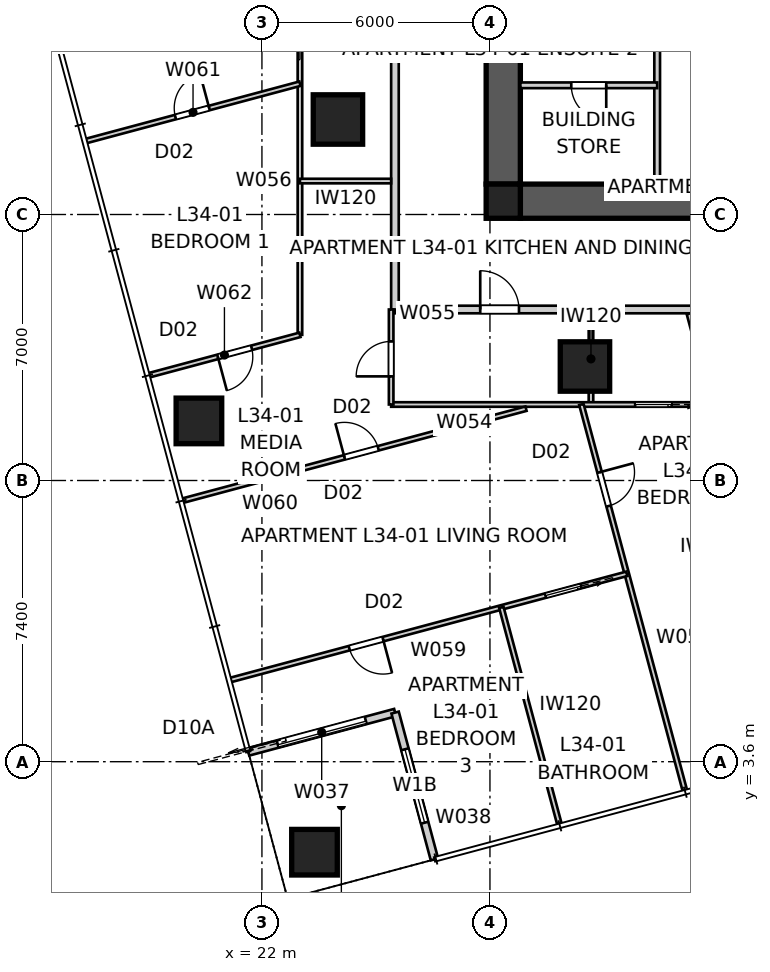
"""IFC4 building model, lengths in metres.
Left out: names, types, materials, properties, quantities, classifications, styles, units other than length and angle.
Written with IfcOpenShell. Run it as: python <this file> out.ifc"""

import sys

from ifc_helpers import new_model, si_unit, direction, frame, frame_2d, origin, origin_2d, place, context, subcontext, project, spatial, polyline, rectangle, outline, extrude, element, fill, save


model = new_model("IFC4")
c1 = context("Model", 3, precision=1e-05, world=origin(), true_north=direction((0.0, 1.0)))
c2 = subcontext(c1, "Body", "Model", "MODEL_VIEW")
j1 = project(units=[si_unit("LENGTHUNIT", "METRE"), si_unit("PLANEANGLEUNIT", "RADIAN")], contexts=[c1])
p1 = place(None, origin())
s1 = spatial("IfcSite", under=j1, at=p1, CompositionType="ELEMENT")
p2 = place(p1, origin())
s2 = spatial("IfcBuilding", under=s1, at=p2, CompositionType="ELEMENT")
p3 = place(p2, frame((0.0, 0.0, 125.2)))
s3 = spatial("IfcBuildingStorey", under=s2, at=p3, CompositionType="ELEMENT", Elevation=125.2)
p4 = place(p3, frame((51.2, 18.35, 0.0), z_axis=(0.0, 0.0, 1.0), x_axis=(-1.0, 0.0, 0.0)))
e1 = element("IfcWall", 1, at=p4, inside=s3, PredefinedType="SHEAR", context=c2, shape_type="SweptSolid", body=[
    extrude(outline(polyline([(0.0, -0.45), (22.4, -0.45), (22.4, -0.025), (22.85, -0.025), (22.85, 0.025), (22.4, 0.025), (22.4, 0.45), (0.0, 0.45), (0.0, 0.025), (-0.45, 0.025), (-0.45, -0.025), (0.0, -0.025), (0.0, -0.45)])), origin(), (0.0, 0.0, 1.0), 3.4),
])
p5 = place(p3, frame((28.35, 41.2, 0.0), z_axis=(0.0, 0.0, 1.0), x_axis=(0.0, -1.0, 0.0)))
e2 = element("IfcWall", 2, at=p5, inside=s3, PredefinedType="SHEAR", context=c2, shape_type="SweptSolid", body=[
    extrude(outline(polyline([(0.0, -0.45), (22.4, -0.45), (22.4, -0.025), (22.85, -0.025), (22.85, 0.025), (22.4, 0.025), (22.4, 0.45), (0.0, 0.45), (0.0, 0.025), (-0.45, 0.025), (-0.45, -0.025), (0.0, -0.025), (0.0, -0.45)])), origin(), (0.0, 0.0, 1.0), 3.4),
])
p6 = place(p5, frame((11.14, 0.0, 0.0)))
e3 = element("IfcOpeningElement", 3, at=p6, cuts=e2, PredefinedType="OPENING", context=c2, shape_type="SweptSolid", body=[
    extrude(rectangle(XDim=1.02, YDim=2.4, at=frame_2d((0.51, 1.2))), frame((0.0, 0.46, 0.0), z_axis=(0.0, -1.0, 0.0), x_axis=(1.0, 0.0, 0.0)), (0.0, 0.0, 1.0), 0.92),
])
p7 = place(p3, frame((28.35, 18.35, 0.0), z_axis=(0.0, 0.0, 1.0), x_axis=(1.0, 0.0, 0.0)))
e4 = element("IfcColumn", 4, at=p7, inside=s3, PredefinedType="COLUMN", context=c2, shape_type="SweptSolid", body=[
    extrude(rectangle(XDim=0.9, YDim=0.9, at=origin_2d()), origin(), (0.0, 0.0, 1.0), 3.4),
])
for number, where, z_axis, x_axis in (
    (5, (23.383, 1.219, 0.0), (0.0, 0.0, 1.0), (1.0, 0.0, 0.0)),
    (6, (20.342, 12.568, 0.0), (0.0, 0.0, 1.0), (1.0, 0.0, 0.0)),
):
    element("IfcColumn", number, at=place(p3, frame(where, z_axis=z_axis, x_axis=x_axis)), inside=s3, PredefinedType="COLUMN", context=c2, shape_type="SweptSolid", body=[
        extrude(rectangle(XDim=1.2, YDim=1.2, at=origin_2d()), origin(), (0.0, 0.0, 1.0), 3.4),
    ])
for number, where, z_axis, x_axis in (
    (7, (24.0, 20.5, 0.0), (0.0, 0.0, 1.0), (1.0, 0.0, 0.0)),
    (8, (30.5, 14.0, 0.0), (0.0, 0.0, 1.0), (1.0, 0.0, 0.0)),
):
    element("IfcColumn", number, at=place(p3, frame(where, z_axis=z_axis, x_axis=x_axis)), inside=s3, PredefinedType="COLUMN", context=c2, shape_type="SweptSolid", body=[
        extrude(rectangle(XDim=1.3, YDim=1.3, at=origin_2d()), origin(), (0.0, 0.0, 1.0), 3.4),
    ])
p8 = place(p3, frame((21.641, 3.857, 0.0), z_axis=(0.0, 0.0, 1.0), x_axis=(0.965919172068, 0.258843877716, 0.0)))
e9 = element("IfcWall", 9, at=p8, inside=s3, PredefinedType="SOLIDWALL", context=c2, shape_type="SweptSolid", body=[
    extrude(rectangle(XDim=4.0, YDim=0.2, at=frame_2d((2.0, 0.0))), origin(), (0.0, 0.0, 1.0), 3.25),
])
p9 = place(p8, frame((0.8, 0.0, 0.0)))
e10 = element("IfcOpeningElement", 10, at=p9, cuts=e9, PredefinedType="OPENING", context=c2, shape_type="SweptSolid", body=[
    extrude(rectangle(XDim=2.4, YDim=2.1, at=frame_2d((1.2, 1.05))), frame((0.0, 0.11, 0.0), z_axis=(0.0, -1.0, 0.0), x_axis=(1.0, 0.0, 0.0)), (0.0, 0.0, 1.0), 0.22),
])
p10 = place(p3, frame((25.504, 4.893, 0.0), z_axis=(0.0, 0.0, 1.0), x_axis=(0.258786931944, -0.965934430412, 0.0)))
e11 = element("IfcWall", 11, at=p10, inside=s3, PredefinedType="SOLIDWALL", context=c2, shape_type="SweptSolid", body=[
    extrude(rectangle(XDim=4.0, YDim=0.2, at=frame_2d((2.0, 0.0))), origin(), (0.0, 0.0, 1.0), 3.25),
])
p11 = place(p10, frame((1.0, 0.0, 0.45)))
e12 = element("IfcOpeningElement", 12, at=p11, cuts=e11, PredefinedType="OPENING", context=c2, shape_type="SweptSolid", body=[
    extrude(rectangle(XDim=2.0, YDim=1.8, at=frame_2d((1.0, 0.9))), frame((0.0, 0.11, 0.0), z_axis=(0.0, -1.0, 0.0), x_axis=(1.0, 0.0, 0.0)), (0.0, 0.0, 1.0), 0.22),
])
p12 = place(p3, frame((25.5, 15.5, 0.0), z_axis=(0.0, 0.0, 1.0), x_axis=(1.0, 0.0, 0.0)))
e13 = element("IfcWall", 13, at=p12, inside=s3, PredefinedType="PARTITIONING", context=c2, shape_type="SweptSolid", body=[
    extrude(rectangle(XDim=28.2, YDim=0.2, at=frame_2d((14.1, 0.0))), origin(), (0.0, 0.0, 1.0), 3.25),
])
p13 = place(p12, frame((2.244, 0.0, 0.0)))
e14 = element("IfcOpeningElement", 14, at=p13, cuts=e13, PredefinedType="OPENING", context=c2, shape_type="SweptSolid", body=[
    extrude(rectangle(XDim=1.02, YDim=2.1, at=frame_2d((0.51, 1.05))), frame((0.0, 0.11, 0.0), z_axis=(0.0, -1.0, 0.0), x_axis=(1.0, 0.0, 0.0)), (0.0, 0.0, 1.0), 0.22),
])
p14 = place(p12, frame((9.542, 0.0, 0.0)))
e15 = element("IfcOpeningElement", 15, at=p14, cuts=e13, PredefinedType="OPENING", context=c2, shape_type="SweptSolid", body=[
    extrude(rectangle(XDim=1.02, YDim=2.34, at=frame_2d((0.51, 1.17))), frame((0.0, 0.11, 0.0), z_axis=(0.0, -1.0, 0.0), x_axis=(1.0, 0.0, 0.0)), (0.0, 0.0, 1.0), 0.22),
])
p15 = place(p12, frame((21.994, 0.0, 0.0)))
e16 = element("IfcOpeningElement", 16, at=p15, cuts=e13, PredefinedType="OPENING", context=c2, shape_type="SweptSolid", body=[
    extrude(rectangle(XDim=1.02, YDim=2.34, at=frame_2d((0.51, 1.17))), frame((0.0, 0.11, 0.0), z_axis=(0.0, -1.0, 0.0), x_axis=(1.0, 0.0, 0.0)), (0.0, 0.0, 1.0), 0.22),
])
p16 = place(p3, frame((25.5, 43.7, 0.0), z_axis=(0.0, 0.0, 1.0), x_axis=(0.0, -1.0, 0.0)))
e17 = element("IfcWall", 17, at=p16, inside=s3, PredefinedType="PARTITIONING", context=c2, shape_type="SweptSolid", body=[
    extrude(rectangle(XDim=28.2, YDim=0.2, at=frame_2d((14.1, 0.0))), origin(), (0.0, 0.0, 1.0), 3.25),
])
p17 = place(p16, frame((8.742, 0.0, 0.0)))
e18 = element("IfcOpeningElement", 18, at=p17, cuts=e17, PredefinedType="OPENING", context=c2, shape_type="SweptSolid", body=[
    extrude(rectangle(XDim=1.02, YDim=2.34, at=frame_2d((0.51, 1.17))), frame((0.0, 0.11, 0.0), z_axis=(0.0, -1.0, 0.0), x_axis=(1.0, 0.0, 0.0)), (0.0, 0.0, 1.0), 0.22),
])
p18 = place(p16, frame((1.808, 0.0, 0.0)))
e19 = element("IfcOpeningElement", 19, at=p18, cuts=e17, PredefinedType="OPENING", context=c2, shape_type="SweptSolid", body=[
    extrude(rectangle(XDim=1.02, YDim=2.1, at=frame_2d((0.51, 1.05))), frame((0.0, 0.11, 0.0), z_axis=(0.0, -1.0, 0.0), x_axis=(1.0, 0.0, 0.0)), (0.0, 0.0, 1.0), 0.22),
])
p19 = place(p3, frame((36.44, 3.682, 0.0), z_axis=(0.0, 0.0, 1.0), x_axis=(-0.258824223352, 0.965924438766, 0.0)))
e20 = element("IfcWall", 20, at=p19, inside=s3, PredefinedType="PARTITIONING", context=c2, shape_type="SweptSolid", body=[
    extrude(rectangle(XDim=12.138, YDim=0.25, at=frame_2d((6.069, 0.0))), origin(), (0.0, 0.0, 1.0), 3.25),
])
p20 = place(p3, frame((32.4, 18.8, 0.0), z_axis=(0.0, 0.0, 1.0), x_axis=(0.0, 1.0, 0.0)))
e21 = element("IfcWall", 21, at=p20, inside=s3, PredefinedType="SOLIDWALL", context=c2, shape_type="SweptSolid", body=[
    extrude(rectangle(XDim=5.9, YDim=0.15, at=frame_2d((2.95, 0.0))), origin(), (0.0, 0.0, 1.0), 3.25),
])
p21 = place(p3, frame((32.4, 21.4, 0.0), z_axis=(0.0, 0.0, 1.0), x_axis=(-1.0, 0.0, 0.0)))
e22 = element("IfcWall", 22, at=p21, inside=s3, PredefinedType="SOLIDWALL", context=c2, shape_type="SweptSolid", body=[
    extrude(rectangle(XDim=3.6, YDim=0.15, at=frame_2d((1.8, 0.0))), origin(), (0.0, 0.0, 1.0), 3.25),
])
p22 = place(p21, frame((1.34, 0.0, 0.0)))
e23 = element("IfcOpeningElement", 23, at=p22, cuts=e22, PredefinedType="OPENING", context=c2, shape_type="SweptSolid", body=[
    extrude(rectangle(XDim=0.92, YDim=2.1, at=frame_2d((0.46, 1.05))), frame((0.0, 0.085, 0.0), z_axis=(0.0, -1.0, 0.0), x_axis=(1.0, 0.0, 0.0)), (0.0, 0.0, 1.0), 0.17),
])
p23 = place(p3, frame((30.658, 15.4, 0.0), z_axis=(0.0, 0.0, 1.0), x_axis=(0.0, -1.0, 0.0)))
e24 = element("IfcWall", 24, at=p23, inside=s3, PredefinedType="PARTITIONING", context=c2, shape_type="SweptSolid", body=[
    extrude(rectangle(XDim=2.4, YDim=0.12, at=frame_2d((1.2, 0.0))), origin(), (0.0, 0.0, 1.0), 3.25),
])
p24 = place(p3, frame((41.07, 13.0, 0.0), z_axis=(0.0, 0.0, 1.0), x_axis=(-1.0, 0.0, 0.0)))
e25 = element("IfcWall", 25, at=p24, inside=s3, PredefinedType="PARTITIONING", context=c2, shape_type="SweptSolid", body=[
    extrude(rectangle(XDim=15.67, YDim=0.12, at=frame_2d((7.835, 0.0))), origin(), (0.0, 0.0, 1.0), 2.55),
])
p25 = place(p24, frame((5.772, 0.0, 0.0)))
e26 = element("IfcOpeningElement", 26, at=p25, cuts=e25, PredefinedType="OPENING", context=c2, shape_type="SweptSolid", body=[
    extrude(rectangle(XDim=0.92, YDim=2.34, at=frame_2d((0.46, 1.17))), frame((0.0, 0.07, 0.0), z_axis=(0.0, -1.0, 0.0), x_axis=(1.0, 0.0, 0.0)), (0.0, 0.0, 1.0), 0.14),
])
p26 = place(p24, frame((8.289, 0.0, 0.0)))
e27 = element("IfcOpeningElement", 27, at=p26, cuts=e25, PredefinedType="OPENING", context=c2, shape_type="SweptSolid", body=[
    extrude(rectangle(XDim=0.96, YDim=2.1, at=frame_2d((0.48, 1.05))), frame((0.0, 0.07, 0.0), z_axis=(0.0, -1.0, 0.0), x_axis=(1.0, 0.0, 0.0)), (0.0, 0.0, 1.0), 0.14),
])
p27 = place(p3, frame((25.4, 13.0, 0.0), z_axis=(0.0, 0.0, 1.0), x_axis=(0.0, 1.0, 0.0)))
e28 = element("IfcWall", 28, at=p27, inside=s3, PredefinedType="PARTITIONING", context=c2, shape_type="SweptSolid", body=[
    extrude(rectangle(XDim=2.5, YDim=0.12, at=frame_2d((1.25, 0.0))), origin(), (0.0, 0.0, 1.0), 3.25),
])
p28 = place(p27, frame((0.74, 0.0, 0.0)))
e29 = element("IfcOpeningElement", 29, at=p28, cuts=e28, PredefinedType="OPENING", context=c2, shape_type="SweptSolid", body=[
    extrude(rectangle(XDim=0.92, YDim=2.34, at=frame_2d((0.46, 1.17))), frame((0.0, 0.07, 0.0), z_axis=(0.0, -1.0, 0.0), x_axis=(1.0, 0.0, 0.0)), (0.0, 0.0, 1.0), 0.14),
])
p29 = place(p3, frame((23.0, 14.833, 0.0), z_axis=(0.0, 0.0, 1.0), x_axis=(0.0, 1.0, 0.0)))
e30 = element("IfcWall", 30, at=p29, inside=s3, PredefinedType="PARTITIONING", context=c2, shape_type="SweptSolid", body=[
    extrude(rectangle(XDim=14.034, YDim=0.12, at=frame_2d((7.017, 0.0))), origin(), (0.0, 0.0, 1.0), 2.55),
])
p30 = place(p29, frame((11.843, 0.0, 0.0)))
e31 = element("IfcOpeningElement", 31, at=p30, cuts=e30, PredefinedType="OPENING", context=c2, shape_type="SweptSolid", body=[
    extrude(rectangle(XDim=0.96, YDim=2.1, at=frame_2d((0.48, 1.05))), frame((0.0, 0.07, 0.0), z_axis=(0.0, -1.0, 0.0), x_axis=(1.0, 0.0, 0.0)), (0.0, 0.0, 1.0), 0.14),
])
p31 = place(p29, frame((8.104, 0.0, 0.0)))
e32 = element("IfcOpeningElement", 32, at=p31, cuts=e30, PredefinedType="OPENING", context=c2, shape_type="SweptSolid", body=[
    extrude(rectangle(XDim=0.96, YDim=2.1, at=frame_2d((0.48, 1.05))), frame((0.0, 0.07, 0.0), z_axis=(0.0, -1.0, 0.0), x_axis=(1.0, 0.0, 0.0)), (0.0, 0.0, 1.0), 0.14),
])
p32 = place(p3, frame((25.4, 18.88, 0.0), z_axis=(0.0, 0.0, 1.0), x_axis=(-1.0, 0.0, 0.0)))
e33 = element("IfcWall", 33, at=p32, inside=s3, PredefinedType="PARTITIONING", context=c2, shape_type="SweptSolid", body=[
    extrude(rectangle(XDim=2.4, YDim=0.12, at=frame_2d((1.2, 0.0))), origin(), (0.0, 0.0, 1.0), 2.722),
])
p33 = place(p3, frame((30.406, 13.0, 0.0), z_axis=(0.0, 0.0, 1.0), x_axis=(0.258819200315, -0.9659257847, 0.0)))
e34 = element("IfcWall", 34, at=p33, inside=s3, PredefinedType="PARTITIONING", context=c2, shape_type="SweptSolid", body=[
    extrude(rectangle(XDim=10.522, YDim=0.12, at=frame_2d((5.261, 0.0))), origin(), (0.0, 0.0, 1.0), 2.722),
])
p34 = place(p33, frame((1.846, 0.0, 0.0)))
e35 = element("IfcOpeningElement", 35, at=p34, cuts=e34, PredefinedType="OPENING", context=c2, shape_type="SweptSolid", body=[
    extrude(rectangle(XDim=0.92, YDim=2.34, at=frame_2d((0.46, 1.17))), frame((0.0, 0.07, 0.0), z_axis=(0.0, -1.0, 0.0), x_axis=(1.0, 0.0, 0.0)), (0.0, 0.0, 1.0), 0.14),
])
p35 = place(p3, frame((31.6, 8.544, 0.0), z_axis=(0.0, 0.0, 1.0), x_axis=(-0.965927151587, -0.258814098973, 0.0)))
e36 = element("IfcWall", 36, at=p35, inside=s3, PredefinedType="PARTITIONING", context=c2, shape_type="SweptSolid", body=[
    extrude(rectangle(XDim=10.793, YDim=0.12, at=frame_2d((5.396, 0.0))), origin(), (0.0, 0.0, 1.0), 3.25),
])
p36 = place(p35, frame((6.64, 0.0, 0.0)))
e37 = element("IfcOpeningElement", 37, at=p36, cuts=e36, PredefinedType="OPENING", context=c2, shape_type="SweptSolid", body=[
    extrude(rectangle(XDim=0.92, YDim=2.34, at=frame_2d((0.46, 1.17))), frame((0.0, 0.07, 0.0), z_axis=(0.0, -1.0, 0.0), x_axis=(1.0, 0.0, 0.0)), (0.0, 0.0, 1.0), 0.14),
])
p37 = place(p35, frame((1.253, 0.0, 0.0)))
e38 = element("IfcOpeningElement", 38, at=p37, cuts=e36, PredefinedType="OPENING", context=c2, shape_type="SweptSolid", body=[
    extrude(rectangle(XDim=0.96, YDim=2.1, at=frame_2d((0.48, 1.05))), frame((0.0, 0.07, 0.0), z_axis=(0.0, -1.0, 0.0), x_axis=(1.0, 0.0, 0.0)), (0.0, 0.0, 1.0), 0.14),
])
p38 = place(p3, frame((19.911, 10.468, 0.0), z_axis=(0.0, 0.0, 1.0), x_axis=(0.965927203676, 0.25881390457, 0.0)))
e39 = element("IfcWall", 39, at=p38, inside=s3, PredefinedType="PARTITIONING", context=c2, shape_type="SweptSolid", body=[
    extrude(rectangle(XDim=9.357, YDim=0.12, at=frame_2d((4.678, 0.0))), origin(), (0.0, 0.0, 1.0), 2.638),
])
p39 = place(p38, frame((4.411, 0.0, 0.0)))
e40 = element("IfcOpeningElement", 40, at=p39, cuts=e39, PredefinedType="OPENING", context=c2, shape_type="SweptSolid", body=[
    extrude(rectangle(XDim=0.92, YDim=2.34, at=frame_2d((0.46, 1.17))), frame((0.0, 0.07, 0.0), z_axis=(0.0, -1.0, 0.0), x_axis=(1.0, 0.0, 0.0)), (0.0, 0.0, 1.0), 0.14),
])
p40 = place(p3, frame((17.374, 19.934, 0.0), z_axis=(0.0, 0.0, 1.0), x_axis=(0.965929528031, 0.258805229617, 0.0)))
e41 = element("IfcWall", 41, at=p40, inside=s3, PredefinedType="PARTITIONING", context=c2, shape_type="SweptSolid", body=[
    extrude(rectangle(XDim=5.824, YDim=0.12, at=frame_2d((2.912, 0.0))), origin(), (0.0, 0.0, 1.0), 3.25),
])
p41 = place(p40, frame((2.432, 0.0, 0.0)))
e42 = element("IfcOpeningElement", 42, at=p41, cuts=e41, PredefinedType="OPENING", context=c2, shape_type="SweptSolid", body=[
    extrude(rectangle(XDim=0.92, YDim=2.34, at=frame_2d((0.46, 1.17))), frame((0.0, 0.07, 0.0), z_axis=(0.0, -1.0, 0.0), x_axis=(1.0, 0.0, 0.0)), (0.0, 0.0, 1.0), 0.14),
])
p42 = place(p3, frame((23.0, 14.833, 0.0), z_axis=(0.0, 0.0, 1.0), x_axis=(-0.965927919062, -0.258811234642, 0.0)))
e43 = element("IfcWall", 43, at=p42, inside=s3, PredefinedType="PARTITIONING", context=c2, shape_type="SweptSolid", body=[
    extrude(rectangle(XDim=4.114, YDim=0.12, at=frame_2d((2.057, 0.0))), origin(), (0.0, 0.0, 1.0), 3.25),
])
p43 = place(p42, frame((1.317, 0.0, 0.0)))
e44 = element("IfcOpeningElement", 44, at=p43, cuts=e43, PredefinedType="OPENING", context=c2, shape_type="SweptSolid", body=[
    extrude(rectangle(XDim=0.92, YDim=2.34, at=frame_2d((0.46, 1.17))), frame((0.0, 0.07, 0.0), z_axis=(0.0, -1.0, 0.0), x_axis=(1.0, 0.0, 0.0)), (0.0, 0.0, 1.0), 0.14),
])
p44 = place(p3, frame((28.3, 7.66, 0.0), z_axis=(0.0, 0.0, 1.0), x_axis=(0.25882212607, -0.965925000741, 0.0)))
e45 = element("IfcWall", 45, at=p44, inside=s3, PredefinedType="PARTITIONING", context=c2, shape_type="SweptSolid", body=[
    extrude(rectangle(XDim=5.91, YDim=0.12, at=frame_2d((2.955, 0.0))), origin(), (0.0, 0.0, 1.0), 3.25),
])
p45 = place(p9, origin())
e46 = element("IfcDoor", 46, at=p45, inside=s3, OperationType="SLIDING_TO_LEFT", PredefinedType="DOOR", context=c2, shape_type="SweptSolid", body=[
    extrude(rectangle(XDim=2.4, YDim=2.1, at=frame_2d((1.2, 1.05))), frame((0.0, 0.025, 0.0), z_axis=(0.0, -1.0, 0.0), x_axis=(1.0, 0.0, 0.0)), (0.0, 0.0, 1.0), 0.05),
])
fill(e10, e46)
p46 = place(p11, origin())
e47 = element("IfcWindow", 47, at=p46, inside=s3, PartitioningType="SINGLE_PANEL", PredefinedType="WINDOW", context=c2, shape_type="SweptSolid", body=[
    extrude(rectangle(XDim=2.0, YDim=1.8, at=frame_2d((1.0, 0.9))), frame((0.0, 0.03, 0.0), z_axis=(0.0, -1.0, 0.0), x_axis=(1.0, 0.0, 0.0)), (0.0, 0.0, 1.0), 0.06),
])
fill(e12, e47)
p47 = place(p13, origin())
e48 = element("IfcDoor", 48, at=p47, inside=s3, OperationType="SINGLE_SWING_LEFT", PredefinedType="DOOR", context=c2, shape_type="SweptSolid", body=[
    extrude(rectangle(XDim=1.02, YDim=2.1, at=frame_2d((0.51, 1.05))), frame((0.0, 0.025, 0.0), z_axis=(0.0, -1.0, 0.0), x_axis=(1.0, 0.0, 0.0)), (0.0, 0.0, 1.0), 0.05),
])
fill(e14, e48)
p48 = place(p22, origin())
e49 = element("IfcDoor", 49, at=p48, inside=s3, OperationType="SINGLE_SWING_LEFT", PredefinedType="DOOR", context=c2, shape_type="SweptSolid", body=[
    extrude(rectangle(XDim=0.92, YDim=2.1, at=frame_2d((0.46, 1.05))), frame((0.0, 0.025, 0.0), z_axis=(0.0, -1.0, 0.0), x_axis=(1.0, 0.0, 0.0)), (0.0, 0.0, 1.0), 0.05),
])
fill(e23, e49)
p49 = place(p28, origin())
e50 = element("IfcDoor", 50, at=p49, inside=s3, OperationType="SINGLE_SWING_LEFT", PredefinedType="DOOR", context=c2, shape_type="SweptSolid", body=[
    extrude(rectangle(XDim=0.92, YDim=2.34, at=frame_2d((0.46, 1.17))), frame((0.0, 0.025, 0.0), z_axis=(0.0, -1.0, 0.0), x_axis=(1.0, 0.0, 0.0)), (0.0, 0.0, 1.0), 0.05),
])
fill(e29, e50)
p50 = place(p39, origin())
e51 = element("IfcDoor", 51, at=p50, inside=s3, OperationType="SINGLE_SWING_LEFT", PredefinedType="DOOR", context=c2, shape_type="SweptSolid", body=[
    extrude(rectangle(XDim=0.92, YDim=2.34, at=frame_2d((0.46, 1.17))), frame((0.0, 0.025, 0.0), z_axis=(0.0, -1.0, 0.0), x_axis=(1.0, 0.0, 0.0)), (0.0, 0.0, 1.0), 0.05),
])
fill(e40, e51)
p51 = place(p43, origin())
e52 = element("IfcDoor", 52, at=p51, inside=s3, OperationType="SINGLE_SWING_RIGHT", PredefinedType="DOOR", context=c2, shape_type="SweptSolid", body=[
    extrude(rectangle(XDim=0.92, YDim=2.34, at=frame_2d((0.46, 1.17))), frame((0.0, 0.025, 0.0), z_axis=(0.0, -1.0, 0.0), x_axis=(1.0, 0.0, 0.0)), (0.0, 0.0, 1.0), 0.05),
])
fill(e44, e52)
p52 = place(p36, origin())
e53 = element("IfcDoor", 53, at=p52, inside=s3, OperationType="SINGLE_SWING_LEFT", PredefinedType="DOOR", context=c2, shape_type="SweptSolid", body=[
    extrude(rectangle(XDim=0.92, YDim=2.34, at=frame_2d((0.46, 1.17))), frame((0.0, 0.025, 0.0), z_axis=(0.0, -1.0, 0.0), x_axis=(1.0, 0.0, 0.0)), (0.0, 0.0, 1.0), 0.05),
])
fill(e37, e53)
p53 = place(p34, origin())
e54 = element("IfcDoor", 54, at=p53, inside=s3, OperationType="SINGLE_SWING_LEFT", PredefinedType="DOOR", context=c2, shape_type="SweptSolid", body=[
    extrude(rectangle(XDim=0.92, YDim=2.34, at=frame_2d((0.46, 1.17))), frame((0.0, 0.025, 0.0), z_axis=(0.0, -1.0, 0.0), x_axis=(1.0, 0.0, 0.0)), (0.0, 0.0, 1.0), 0.05),
])
fill(e35, e54)
p54 = place(p37, origin())
e55 = element("IfcDoor", 55, at=p54, inside=s3, OperationType="SLIDING_TO_LEFT", PredefinedType="DOOR", context=c2, shape_type="SweptSolid", body=[
    extrude(rectangle(XDim=0.96, YDim=2.1, at=frame_2d((0.48, 1.05))), frame((0.0, 0.025, 0.0), z_axis=(0.0, -1.0, 0.0), x_axis=(1.0, 0.0, 0.0)), (0.0, 0.0, 1.0), 0.05),
])
fill(e38, e55)
p55 = place(p41, origin())
e56 = element("IfcDoor", 56, at=p55, inside=s3, OperationType="SINGLE_SWING_RIGHT", PredefinedType="DOOR", context=c2, shape_type="SweptSolid", body=[
    extrude(rectangle(XDim=0.92, YDim=2.34, at=frame_2d((0.46, 1.17))), frame((0.0, 0.025, 0.0), z_axis=(0.0, -1.0, 0.0), x_axis=(1.0, 0.0, 0.0)), (0.0, 0.0, 1.0), 0.05),
])
fill(e42, e56)
p56 = place(p26, origin())
e57 = element("IfcDoor", 57, at=p56, inside=s3, OperationType="SLIDING_TO_LEFT", PredefinedType="DOOR", context=c2, shape_type="SweptSolid", body=[
    extrude(rectangle(XDim=0.96, YDim=2.1, at=frame_2d((0.48, 1.05))), frame((0.0, 0.025, 0.0), z_axis=(0.0, -1.0, 0.0), x_axis=(1.0, 0.0, 0.0)), (0.0, 0.0, 1.0), 0.05),
])
fill(e27, e57)
save(model, sys.argv[1])
